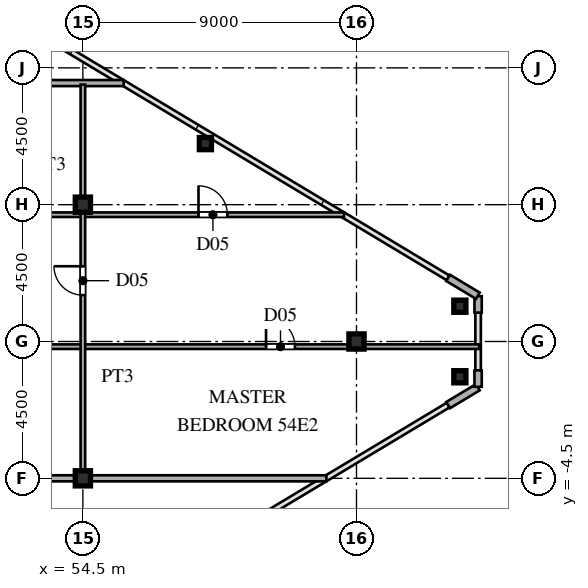
"""IFC4 building model, lengths in metres.
Left out: names, types, materials, properties, quantities, classifications, styles, units other than length and angle.
Written with IfcOpenShell. Run it as: python <this file> out.ifc"""

import sys

from ifc_helpers import new_model, si_unit, direction, frame, frame_2d, origin, origin_2d, place, context, subcontext, project, spatial, rectangle, hollow_rectangle, i_section, extrude, source, transform, mapped, element, fill, save


model = new_model("IFC4")
c1 = context("Model", 3, precision=1e-05, world=origin(), true_north=direction((0.0, 1.0)))
c2 = subcontext(c1, "Body", "Model", "MODEL_VIEW")
j1 = project(units=[si_unit("LENGTHUNIT", "METRE"), si_unit("PLANEANGLEUNIT", "RADIAN")], contexts=[c1])
p1 = place(None, origin())
s1 = spatial("IfcSite", under=j1, at=p1, CompositionType="ELEMENT")
p2 = place(p1, origin())
s2 = spatial("IfcBuilding", under=s1, at=p2, CompositionType="ELEMENT")
p3 = place(p2, frame((0.0, 0.0, 203.1)))
s3 = spatial("IfcBuildingStorey", under=s2, at=p3, CompositionType="ELEMENT", Elevation=203.1)
m1 = source(origin(), c2, "Body", "SweptSolid", [
    extrude(i_section(OverallWidth=0.5, OverallDepth=0.5, WebThickness=0.02, FlangeThickness=0.032, at=origin_2d()), origin(), (0.0, 0.0, 1.0), 3.6),
])
for number, where, z_axis, x_axis in (
    (1, (54.5, -4.5, 0.0), (0.0, 0.0, 1.0), (1.0, 0.0, 0.0)),
    (2, (54.5, 4.5, 0.0), (0.0, 0.0, 1.0), (1.0, 0.0, 0.0)),
    (3, (63.5, 0.0, 0.0), (0.0, 0.0, 1.0), (1.0, 0.0, 0.0)),
):
    element("IfcColumn", number, at=place(p3, frame(where, z_axis=z_axis, x_axis=x_axis)), inside=s3, PredefinedType="COLUMN", context=c2, shape_type="MappedRepresentation", body=[
        mapped(m1, transform((0.0, 0.0, 0.0), scale=1.0)),
    ])
m2 = source(origin(), c2, "Body", "SweptSolid", [
    extrude(hollow_rectangle(XDim=0.4, YDim=0.4, WallThickness=0.016, at=origin_2d()), origin(), (0.0, 0.0, 1.0), 3.6),
])
for number, where, z_axis, x_axis in (
    (4, (66.9, -1.16, 0.0), (0.0, 0.0, 1.0), (1.0, 0.0, 0.0)),
    (5, (66.9, 1.16, 0.0), (0.0, 0.0, 1.0), (1.0, 0.0, 0.0)),
    (6, (58.53, 6.509, 0.0), (0.0, 0.0, 1.0), (1.0, 0.0, 0.0)),
):
    element("IfcColumn", number, at=place(p3, frame(where, z_axis=z_axis, x_axis=x_axis)), inside=s3, PredefinedType="COLUMN", context=c2, shape_type="MappedRepresentation", body=[
        mapped(m2, transform((0.0, 0.0, 0.0), scale=1.0)),
    ])
p4 = place(p3, frame((66.514, -2.092, 0.0), z_axis=(0.0, 0.0, 1.0), x_axis=(0.85743623509, 0.514590228002, 0.0)))
e7 = element("IfcWall", 7, at=p4, inside=s3, PredefinedType="SOLIDWALL", context=c2, shape_type="SweptSolid", body=[
    extrude(rectangle(XDim=1.14, YDim=0.24, at=frame_2d((0.57, 0.0))), origin(), (0.0, 0.0, 1.0), 3.38),
])
for number, where, z_axis, x_axis in (
    (8, (67.5, -1.49, 0.0), (0.0, 0.0, 1.0), (0.0, 1.0, 0.0)),
    (9, (67.5, 0.95, 0.0), (0.0, 0.0, 1.0), (0.0, 1.0, 0.0)),
):
    element("IfcWall", number, at=place(p3, frame(where, z_axis=z_axis, x_axis=x_axis)), inside=s3, PredefinedType="SOLIDWALL", context=c2, shape_type="SweptSolid", body=[
        extrude(rectangle(XDim=0.54, YDim=0.24, at=frame_2d((0.27, 0.0))), origin(), (0.0, 0.0, 1.0), 3.38),
    ])
p5 = place(p3, frame((67.491, 1.505, 0.0), z_axis=(0.0, 0.0, 1.0), x_axis=(-0.85743623509, 0.514590228002, 0.0)))
e10 = element("IfcWall", 10, at=p5, inside=s3, PredefinedType="SOLIDWALL", context=c2, shape_type="SweptSolid", body=[
    extrude(rectangle(XDim=1.14, YDim=0.24, at=frame_2d((0.57, 0.0))), origin(), (0.0, 0.0, 1.0), 3.38),
])
p6 = place(p3, frame((39.43, -4.5, 0.0), z_axis=(0.0, 0.0, 1.0), x_axis=(1.0, 0.0, 0.0)))
e11 = element("IfcWall", 11, at=p6, inside=s3, PredefinedType="PARTITIONING", context=c2, shape_type="SweptSolid", body=[
    extrude(rectangle(XDim=15.09, YDim=0.2, at=frame_2d((7.545, 0.0))), origin(), (0.0, 0.0, 1.0), 2.78),
])
p7 = place(p3, frame((54.52, -4.5, 0.0), z_axis=(0.0, 0.0, 1.0), x_axis=(1.0, 0.0, 0.0)))
e12 = element("IfcWall", 12, at=p7, inside=s3, PredefinedType="PARTITIONING", context=c2, shape_type="SweptSolid", body=[
    extrude(rectangle(XDim=7.99, YDim=0.2, at=frame_2d((3.995, 0.0))), origin(), (0.0, 0.0, 1.0), 3.38),
])
p8 = place(p3, frame((43.75, -0.17, 0.0), z_axis=(0.0, 0.0, 1.0), x_axis=(1.0, 0.0, 0.0)))
e13 = element("IfcWall", 13, at=p8, inside=s3, PredefinedType="PARTITIONING", context=c2, shape_type="SweptSolid", body=[
    extrude(rectangle(XDim=23.785, YDim=0.15, at=frame_2d((11.893, 0.0))), origin(), (0.0, 0.0, 1.0), 3.38),
])
p9 = place(p8, frame((4.875, 0.0, 0.0)))
e14 = element("IfcOpeningElement", 14, at=p9, cuts=e13, PredefinedType="OPENING", context=c2, shape_type="SweptSolid", body=[
    extrude(rectangle(XDim=0.95, YDim=2.15, at=frame_2d((0.475, 1.075))), frame((0.0, 0.085, 0.0), z_axis=(0.0, -1.0, 0.0), x_axis=(1.0, 0.0, 0.0)), (0.0, 0.0, 1.0), 0.17),
])
p10 = place(p8, frame((16.775, 0.0, 0.0)))
e15 = element("IfcOpeningElement", 15, at=p10, cuts=e13, PredefinedType="OPENING", context=c2, shape_type="SweptSolid", body=[
    extrude(rectangle(XDim=0.95, YDim=2.15, at=frame_2d((0.475, 1.075))), frame((0.0, 0.085, 0.0), z_axis=(0.0, -1.0, 0.0), x_axis=(1.0, 0.0, 0.0)), (0.0, 0.0, 1.0), 0.17),
])
p11 = place(p3, frame((43.75, 4.17, 0.0), z_axis=(0.0, 0.0, 1.0), x_axis=(1.0, 0.0, 0.0)))
e16 = element("IfcWall", 16, at=p11, inside=s3, PredefinedType="PARTITIONING", context=c2, shape_type="SweptSolid", body=[
    extrude(rectangle(XDim=19.34, YDim=0.15, at=frame_2d((9.67, 0.0))), origin(), (0.0, 0.0, 1.0), 3.38),
])
p12 = place(p11, frame((4.875, 0.0, 0.0)))
e17 = element("IfcOpeningElement", 17, at=p12, cuts=e16, PredefinedType="OPENING", context=c2, shape_type="SweptSolid", body=[
    extrude(rectangle(XDim=0.95, YDim=2.15, at=frame_2d((0.475, 1.075))), frame((0.0, 0.085, 0.0), z_axis=(0.0, -1.0, 0.0), x_axis=(1.0, 0.0, 0.0)), (0.0, 0.0, 1.0), 0.17),
])
p13 = place(p11, frame((14.553, 0.0, 0.0)))
e18 = element("IfcOpeningElement", 18, at=p13, cuts=e16, PredefinedType="OPENING", context=c2, shape_type="SweptSolid", body=[
    extrude(rectangle(XDim=0.95, YDim=2.15, at=frame_2d((0.475, 1.075))), frame((0.0, 0.085, 0.0), z_axis=(0.0, -1.0, 0.0), x_axis=(1.0, 0.0, 0.0)), (0.0, 0.0, 1.0), 0.17),
])
p14 = place(p3, frame((39.43, 8.5, 0.0), z_axis=(0.0, 0.0, 1.0), x_axis=(1.0, 0.0, 0.0)))
e19 = element("IfcWall", 19, at=p14, inside=s3, PredefinedType="PARTITIONING", context=c2, shape_type="SweptSolid", body=[
    extrude(rectangle(XDim=16.413, YDim=0.2, at=frame_2d((8.207, 0.0))), origin(), (0.0, 0.0, 1.0), 3.38),
])
p15 = place(p3, frame((54.5, -4.45, 0.0), z_axis=(0.0, 0.0, 1.0), x_axis=(0.0, 1.0, 0.0)))
e20 = element("IfcWall", 20, at=p15, inside=s3, PredefinedType="PARTITIONING", context=c2, shape_type="SweptSolid", body=[
    extrude(rectangle(XDim=12.9, YDim=0.15, at=frame_2d((6.45, 0.0))), origin(), (0.0, 0.0, 1.0), 2.78),
])
p16 = place(p15, frame((5.975, 0.0, 0.0)))
e21 = element("IfcOpeningElement", 21, at=p16, cuts=e20, PredefinedType="OPENING", context=c2, shape_type="SweptSolid", body=[
    extrude(rectangle(XDim=0.95, YDim=2.15, at=frame_2d((0.475, 1.075))), frame((0.0, 0.085, 0.0), z_axis=(0.0, -1.0, 0.0), x_axis=(1.0, 0.0, 0.0)), (0.0, 0.0, 1.0), 0.17),
])
m3 = source(origin(), c2, "Body", "SweptSolid", [
    extrude(rectangle(XDim=0.95, YDim=2.15, at=frame_2d((0.475, 1.075))), frame((0.0, 0.025, 0.0), z_axis=(0.0, -1.0, 0.0), x_axis=(1.0, 0.0, 0.0)), (0.0, 0.0, 1.0), 0.05),
])
p17 = place(p10, origin())
e22 = element("IfcDoor", 22, at=p17, inside=s3, OperationType="SINGLE_SWING_LEFT", PredefinedType="DOOR", context=c2, shape_type="MappedRepresentation", body=[
    mapped(m3, transform((0.0, 0.0, 0.0), scale=1.0)),
])
fill(e15, e22)
p18 = place(p13, origin())
e23 = element("IfcDoor", 23, at=p18, inside=s3, OperationType="SINGLE_SWING_LEFT", PredefinedType="DOOR", context=c2, shape_type="MappedRepresentation", body=[
    mapped(m3, transform((0.0, 0.0, 0.0), scale=1.0)),
])
fill(e18, e23)
p19 = place(p16, origin())
e24 = element("IfcDoor", 24, at=p19, inside=s3, OperationType="SINGLE_SWING_RIGHT", PredefinedType="DOOR", context=c2, shape_type="MappedRepresentation", body=[
    mapped(m3, transform((0.0, 0.0, 0.0), scale=1.0)),
])
fill(e21, e24)
save(model, sys.argv[1])
